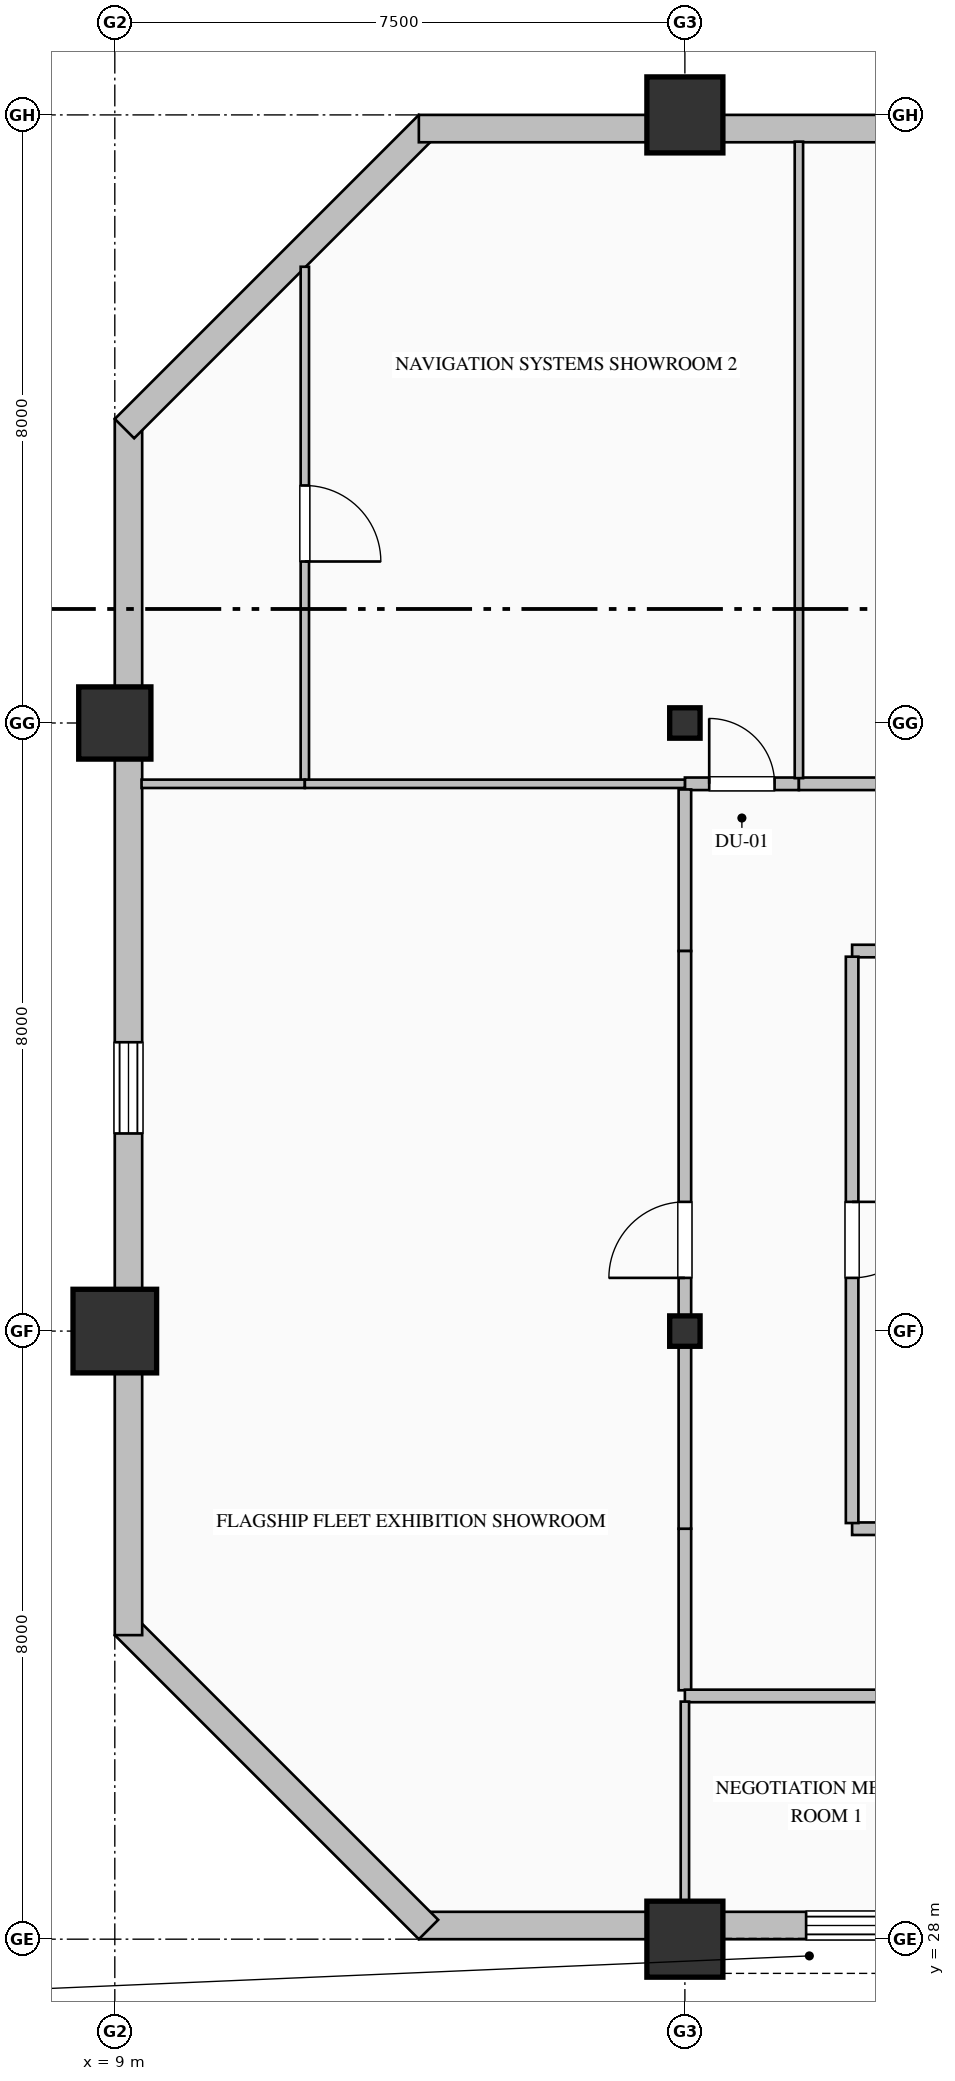
"""IFC4 building model, lengths in metres.
Left out: names, types, materials, properties, quantities, classifications, styles, units other than length and angle.
Written with IfcOpenShell. Run it as: python <this file> out.ifc"""

import sys

from ifc_helpers import new_model, si_unit, direction, frame, frame_2d, origin, origin_2d, place, context, subcontext, project, spatial, rectangle, hollow_rectangle, hollow_circle, i_section, extrude, element, fill, save


model = new_model("IFC4")
c1 = context("Model", 3, precision=1e-05, world=origin(), true_north=direction((0.0, 1.0)))
c2 = subcontext(c1, "Body", "Model", "MODEL_VIEW")
j1 = project(units=[si_unit("LENGTHUNIT", "METRE"), si_unit("PLANEANGLEUNIT", "RADIAN")], contexts=[c1])
p1 = place(None, origin())
s1 = spatial("IfcSite", under=j1, at=p1, CompositionType="ELEMENT")
p2 = place(p1, origin())
s2 = spatial("IfcBuilding", under=s1, at=p2, CompositionType="ELEMENT")
p3 = place(p2, frame((0.0, 0.0, 179.0)))
s3 = spatial("IfcBuildingStorey", under=s2, at=p3, CompositionType="ELEMENT", Elevation=179.0)
p4 = place(p3, frame((9.0, 36.0, 0.0), z_axis=(0.0, 0.0, 1.0), x_axis=(1.0, 0.0, 0.0)))
e1 = element("IfcColumn", 1, at=p4, inside=s3, PredefinedType="COLUMN", context=c2, shape_type="SweptSolid", body=[
    extrude(hollow_rectangle(XDim=1.1, YDim=1.1, WallThickness=0.04, at=origin_2d()), origin(), (0.0, 0.0, 1.0), 4.0),
])
p5 = place(p3, frame((9.0, 44.0, 0.0), z_axis=(0.0, 0.0, 1.0), x_axis=(1.0, 0.0, 0.0)))
e2 = element("IfcColumn", 2, at=p5, inside=s3, PredefinedType="COLUMN", context=c2, shape_type="SweptSolid", body=[
    extrude(hollow_rectangle(XDim=0.95, YDim=0.95, WallThickness=0.036, at=origin_2d()), origin(), (0.0, 0.0, 1.0), 4.0),
])
p6 = place(p3, frame((16.5, 28.0, 0.0), z_axis=(0.0, 0.0, 1.0), x_axis=(1.0, 0.0, 0.0)))
e3 = element("IfcColumn", 3, at=p6, inside=s3, PredefinedType="COLUMN", context=c2, shape_type="SweptSolid", body=[
    extrude(hollow_circle(Radius=0.5, WallThickness=0.036, at=origin_2d()), origin(), (0.0, 0.0, 1.0), 4.0),
])
for number, where, z_axis, x_axis in (
    (4, (16.5, 36.0, 0.0), (0.0, 0.0, 1.0), (1.0, 0.0, 0.0)),
    (5, (16.5, 44.0, 0.0), (0.0, 0.0, 1.0), (1.0, 0.0, 0.0)),
):
    element("IfcColumn", number, at=place(p3, frame(where, z_axis=z_axis, x_axis=x_axis)), inside=s3, PredefinedType="COLUMN", context=c2, shape_type="SweptSolid", body=[
        extrude(i_section(OverallWidth=0.4, OverallDepth=0.4, WebThickness=0.013, FlangeThickness=0.021, FilletRadius=0.022, at=origin_2d()), origin(), (0.0, 0.0, 1.0), 4.0),
    ])
p7 = place(p3, frame((16.5, 52.0, 0.0), z_axis=(0.0, 0.0, 1.0), x_axis=(1.0, 0.0, 0.0)))
e6 = element("IfcColumn", 6, at=p7, inside=s3, PredefinedType="COLUMN", context=c2, shape_type="SweptSolid", body=[
    extrude(hollow_circle(Radius=0.5, WallThickness=0.036, at=origin_2d()), origin(), (0.0, 0.0, 1.0), 4.0),
])
p8 = place(p3, frame((40.52, 28.18, 0.0), z_axis=(0.0, 0.0, 1.0), x_axis=(-1.0, 0.0, 0.0)))
e7 = element("IfcWall", 7, at=p8, inside=s3, PredefinedType="SOLIDWALL", context=c2, shape_type="SweptSolid", body=[
    extrude(rectangle(XDim=27.52, YDim=0.36, at=frame_2d((13.76, 0.0))), origin(), (0.0, 0.0, 1.0), 3.165),
])
p9 = place(p8, frame((13.8, 0.0, 0.7)))
e8 = element("IfcOpeningElement", 8, at=p9, cuts=e7, PredefinedType="OPENING", context=c2, shape_type="SweptSolid", body=[
    extrude(rectangle(XDim=1.2, YDim=1.85, at=frame_2d((0.6, 0.925))), frame((0.0, 0.19, 0.0), z_axis=(0.0, -1.0, 0.0), x_axis=(1.0, 0.0, 0.0)), (0.0, 0.0, 1.0), 0.38),
])
p10 = place(p8, frame((20.775, 0.0, 0.85)))
e9 = element("IfcOpeningElement", 9, at=p10, cuts=e7, PredefinedType="OPENING", context=c2, shape_type="SweptSolid", body=[
    extrude(rectangle(XDim=1.65, YDim=1.95, at=frame_2d((0.825, 0.975))), frame((0.0, 0.19, 0.0), z_axis=(0.0, -1.0, 0.0), x_axis=(1.0, 0.0, 0.0)), (0.0, 0.0, 1.0), 0.38),
])
p11 = place(p3, frame((13.127, 28.127, 0.0), z_axis=(0.0, 0.0, 1.0), x_axis=(-0.707106781187, 0.707106781187, 0.0)))
e10 = element("IfcWall", 10, at=p11, inside=s3, PredefinedType="SOLIDWALL", context=c2, shape_type="SweptSolid", body=[
    extrude(rectangle(XDim=5.657, YDim=0.36, at=frame_2d((2.828, 0.0))), origin(), (0.0, 0.0, 1.0), 3.765),
])
p12 = place(p3, frame((9.18, 32.0, 0.0), z_axis=(0.0, 0.0, 1.0), x_axis=(0.0, 1.0, 0.0)))
e11 = element("IfcWall", 11, at=p12, inside=s3, PredefinedType="SOLIDWALL", context=c2, shape_type="SweptSolid", body=[
    extrude(rectangle(XDim=16.0, YDim=0.36, at=frame_2d((8.0, 0.0))), origin(), (0.0, 0.0, 1.0), 3.265),
])
p13 = place(p12, frame((6.6, 0.0, 0.7)))
e12 = element("IfcOpeningElement", 12, at=p13, cuts=e11, PredefinedType="OPENING", context=c2, shape_type="SweptSolid", body=[
    extrude(rectangle(XDim=1.2, YDim=1.85, at=frame_2d((0.6, 0.925))), frame((0.0, 0.19, 0.0), z_axis=(0.0, -1.0, 0.0), x_axis=(1.0, 0.0, 0.0)), (0.0, 0.0, 1.0), 0.38),
])
p14 = place(p3, frame((9.127, 47.873, 0.0), z_axis=(0.0, 0.0, 1.0), x_axis=(0.707106781187, 0.707106781187, 0.0)))
e13 = element("IfcWall", 13, at=p14, inside=s3, PredefinedType="SOLIDWALL", context=c2, shape_type="SweptSolid", body=[
    extrude(rectangle(XDim=5.657, YDim=0.36, at=frame_2d((2.828, 0.0))), origin(), (0.0, 0.0, 1.0), 3.765),
])
p15 = place(p3, frame((13.0, 51.82, 0.0), z_axis=(0.0, 0.0, 1.0), x_axis=(1.0, 0.0, 0.0)))
e14 = element("IfcWall", 14, at=p15, inside=s3, PredefinedType="SOLIDWALL", context=c2, shape_type="SweptSolid", body=[
    extrude(rectangle(XDim=27.52, YDim=0.36, at=frame_2d((13.76, 0.0))), origin(), (0.0, 0.0, 1.0), 3.265),
])
p16 = place(p15, frame((6.375, 0.0, 0.85)))
e15 = element("IfcOpeningElement", 15, at=p16, cuts=e14, PredefinedType="OPENING", context=c2, shape_type="SweptSolid", body=[
    extrude(rectangle(XDim=1.65, YDim=1.95, at=frame_2d((0.825, 0.975))), frame((0.0, 0.19, 0.0), z_axis=(0.0, -1.0, 0.0), x_axis=(1.0, 0.0, 0.0)), (0.0, 0.0, 1.0), 0.38),
])
p17 = place(p15, frame((13.65, 0.0, 0.85)))
e16 = element("IfcOpeningElement", 16, at=p17, cuts=e14, PredefinedType="OPENING", context=c2, shape_type="SweptSolid", body=[
    extrude(rectangle(XDim=1.5, YDim=1.95, at=frame_2d((0.75, 0.975))), frame((0.0, 0.19, 0.0), z_axis=(0.0, -1.0, 0.0), x_axis=(1.0, 0.0, 0.0)), (0.0, 0.0, 1.0), 0.38),
])
p18 = place(p3, frame((18.7, 33.4, 0.0), z_axis=(0.0, 0.0, 1.0), x_axis=(1.0, 0.0, 0.0)))
e17 = element("IfcWall", 17, at=p18, inside=s3, PredefinedType="PARTITIONING", context=c2, shape_type="SweptSolid", body=[
    extrude(rectangle(XDim=4.8, YDim=0.165, at=frame_2d((2.4, 0.0))), origin(), (0.0, 0.0, 1.0), 3.765),
])
p19 = place(p3, frame((16.5, 31.274, 0.0), z_axis=(0.0, 0.0, 1.0), x_axis=(0.0, 1.0, 0.0)))
e18 = element("IfcWall", 18, at=p19, inside=s3, PredefinedType="PARTITIONING", context=c2, shape_type="SweptSolid", body=[
    extrude(rectangle(XDim=2.125, YDim=0.165, at=frame_2d((1.063, 0.0))), origin(), (0.0, 0.0, 1.0), 3.157),
])
p20 = place(p3, frame((23.5, 31.2, 0.0), z_axis=(0.0, 0.0, 1.0), x_axis=(-1.0, 0.0, 0.0)))
e19 = element("IfcWall", 19, at=p20, inside=s3, PredefinedType="PARTITIONING", context=c2, shape_type="SweptSolid", body=[
    extrude(rectangle(XDim=7.0, YDim=0.165, at=frame_2d((3.5, 0.0))), origin(), (0.0, 0.0, 1.0), 3.765),
])
p21 = place(p20, frame((2.95, 0.0, 0.0)))
e20 = element("IfcOpeningElement", 20, at=p21, cuts=e19, PredefinedType="OPENING", context=c2, shape_type="SweptSolid", body=[
    extrude(rectangle(XDim=1.1, YDim=2.2, at=frame_2d((0.55, 1.1))), frame((0.0, 0.093, 0.0), z_axis=(0.0, -1.0, 0.0), x_axis=(1.0, 0.0, 0.0)), (0.0, 0.0, 1.0), 0.185),
])
p22 = place(p3, frame((16.5, 43.2, 0.0), z_axis=(0.0, 0.0, 1.0), x_axis=(1.0, 0.0, 0.0)))
e21 = element("IfcWall", 21, at=p22, inside=s3, PredefinedType="PARTITIONING", context=c2, shape_type="SweptSolid", body=[
    extrude(rectangle(XDim=1.5, YDim=0.165, at=frame_2d((0.75, 0.0))), origin(), (0.0, 0.0, 1.0), 3.765),
])
p23 = place(p22, frame((0.32, 0.0, 0.0)))
e22 = element("IfcOpeningElement", 22, at=p23, cuts=e21, PredefinedType="OPENING", context=c2, shape_type="SweptSolid", body=[
    extrude(rectangle(XDim=0.86, YDim=2.1, at=frame_2d((0.43, 1.05))), frame((0.0, 0.093, 0.0), z_axis=(0.0, -1.0, 0.0), x_axis=(1.0, 0.0, 0.0)), (0.0, 0.0, 1.0), 0.185),
])
p24 = place(p3, frame((18.0, 43.2, 0.0), z_axis=(0.0, 0.0, 1.0), x_axis=(1.0, 0.0, 0.0)))
e23 = element("IfcWall", 23, at=p24, inside=s3, PredefinedType="PARTITIONING", context=c2, shape_type="SweptSolid", body=[
    extrude(rectangle(XDim=6.5, YDim=0.165, at=frame_2d((3.25, 0.0))), origin(), (0.0, 0.0, 1.0), 3.765),
])
p25 = place(p24, frame((2.75, 0.0, 0.0)))
e24 = element("IfcOpeningElement", 24, at=p25, cuts=e23, PredefinedType="OPENING", context=c2, shape_type="SweptSolid", body=[
    extrude(rectangle(XDim=1.0, YDim=2.15, at=frame_2d((0.5, 1.075))), frame((0.0, 0.093, 0.0), z_axis=(0.0, -1.0, 0.0), x_axis=(1.0, 0.0, 0.0)), (0.0, 0.0, 1.0), 0.185),
])
p26 = place(p3, frame((23.5, 41.0, 0.0), z_axis=(0.0, 0.0, 1.0), x_axis=(-1.0, 0.0, 0.0)))
e25 = element("IfcWall", 25, at=p26, inside=s3, PredefinedType="PARTITIONING", context=c2, shape_type="SweptSolid", body=[
    extrude(rectangle(XDim=4.8, YDim=0.165, at=frame_2d((2.4, 0.0))), origin(), (0.0, 0.0, 1.0), 3.765),
])
p27 = place(p3, frame((16.5, 41.0, 0.0), z_axis=(0.0, 0.0, 1.0), x_axis=(0.0, 1.0, 0.0)))
e26 = element("IfcWall", 26, at=p27, inside=s3, PredefinedType="PARTITIONING", context=c2, shape_type="SweptSolid", body=[
    extrude(rectangle(XDim=2.125, YDim=0.165, at=frame_2d((1.063, 0.0))), origin(), (0.0, 0.0, 1.0), 3.157),
])
p28 = place(p3, frame((18.7, 40.926, 0.0), z_axis=(0.0, 0.0, 1.0), x_axis=(0.0, -1.0, 0.0)))
e27 = element("IfcWall", 27, at=p28, inside=s3, PredefinedType="PARTITIONING", context=c2, shape_type="SweptSolid", body=[
    extrude(rectangle(XDim=7.451, YDim=0.165, at=frame_2d((3.726, 0.0))), origin(), (0.0, 0.0, 1.0), 3.765),
])
p29 = place(p28, frame((3.226, 0.0, 0.0)))
e28 = element("IfcOpeningElement", 28, at=p29, cuts=e27, PredefinedType="OPENING", context=c2, shape_type="SweptSolid", body=[
    extrude(rectangle(XDim=1.0, YDim=2.15, at=frame_2d((0.5, 1.075))), frame((0.0, 0.093, 0.0), z_axis=(0.0, -1.0, 0.0), x_axis=(1.0, 0.0, 0.0)), (0.0, 0.0, 1.0), 0.185),
])
p30 = place(p3, frame((16.5, 33.4, 0.0), z_axis=(0.0, 0.0, 1.0), x_axis=(0.0, 1.0, 0.0)))
e29 = element("IfcWall", 29, at=p30, inside=s3, PredefinedType="PARTITIONING", context=c2, shape_type="SweptSolid", body=[
    extrude(rectangle(XDim=7.6, YDim=0.165, at=frame_2d((3.8, 0.0))), origin(), (0.0, 0.0, 1.0), 3.157),
])
p31 = place(p30, frame((3.3, 0.0, 0.0)))
e30 = element("IfcOpeningElement", 30, at=p31, cuts=e29, PredefinedType="OPENING", context=c2, shape_type="SweptSolid", body=[
    extrude(rectangle(XDim=1.0, YDim=2.15, at=frame_2d((0.5, 1.075))), frame((0.0, 0.093, 0.0), z_axis=(0.0, -1.0, 0.0), x_axis=(1.0, 0.0, 0.0)), (0.0, 0.0, 1.0), 0.185),
])
p32 = place(p3, frame((11.5, 50.002, 0.0), z_axis=(0.0, 0.0, 1.0), x_axis=(0.0, -1.0, 0.0)))
e31 = element("IfcWall", 31, at=p32, inside=s3, PredefinedType="MOVABLE", context=c2, shape_type="SweptSolid", body=[
    extrude(rectangle(XDim=6.755, YDim=0.11, at=frame_2d((3.377, 0.0))), origin(), (0.0, 0.0, 1.0), 3.765),
])
p33 = place(p32, frame((2.878, 0.0, 0.0)))
e32 = element("IfcOpeningElement", 32, at=p33, cuts=e31, PredefinedType="OPENING", context=c2, shape_type="SweptSolid", body=[
    extrude(rectangle(XDim=1.0, YDim=2.15, at=frame_2d((0.5, 1.075))), frame((0.0, 0.065, 0.0), z_axis=(0.0, -1.0, 0.0), x_axis=(1.0, 0.0, 0.0)), (0.0, 0.0, 1.0), 0.13),
])
p34 = place(p3, frame((11.5, 43.2, 0.0), z_axis=(0.0, 0.0, 1.0), x_axis=(-1.0, 0.0, 0.0)))
e33 = element("IfcWall", 33, at=p34, inside=s3, PredefinedType="MOVABLE", context=c2, shape_type="SweptSolid", body=[
    extrude(rectangle(XDim=2.148, YDim=0.11, at=frame_2d((1.074, 0.0))), origin(), (0.0, 0.0, 1.0), 3.765),
])
p35 = place(p3, frame((18.0, 51.648, 0.0), z_axis=(0.0, 0.0, 1.0), x_axis=(0.0, -1.0, 0.0)))
e34 = element("IfcWall", 34, at=p35, inside=s3, PredefinedType="MOVABLE", context=c2, shape_type="SweptSolid", body=[
    extrude(rectangle(XDim=8.374, YDim=0.11, at=frame_2d((4.187, 0.0))), origin(), (0.0, 0.0, 1.0), 3.765),
])
p36 = place(p3, frame((16.5, 43.2, 0.0), z_axis=(0.0, 0.0, 1.0), x_axis=(-1.0, 0.0, 0.0)))
e35 = element("IfcWall", 35, at=p36, inside=s3, PredefinedType="MOVABLE", context=c2, shape_type="SweptSolid", body=[
    extrude(rectangle(XDim=5.0, YDim=0.11, at=frame_2d((2.5, 0.0))), origin(), (0.0, 0.0, 1.0), 3.765),
])
p37 = place(p3, frame((16.5, 31.125, 0.0), z_axis=(0.0, 0.0, 1.0), x_axis=(0.0, -1.0, 0.0)))
e36 = element("IfcWall", 36, at=p37, inside=s3, PredefinedType="MOVABLE", context=c2, shape_type="SweptSolid", body=[
    extrude(rectangle(XDim=2.773, YDim=0.11, at=frame_2d((1.387, 0.0))), origin(), (0.0, 0.0, 1.0), 3.157),
])
p38 = place(p10, origin())
e37 = element("IfcWindow", 37, at=p38, inside=s3, PartitioningType="DOUBLE_PANEL_VERTICAL", PredefinedType="WINDOW", context=c2, shape_type="SweptSolid", body=[
    extrude(rectangle(XDim=1.65, YDim=1.95, at=frame_2d((0.825, 0.975))), frame((0.0, 0.15, 0.0), z_axis=(0.0, -1.0, 0.0), x_axis=(1.0, 0.0, 0.0)), (0.0, 0.0, 1.0), 0.06),
])
fill(e9, e37)
p39 = place(p13, origin())
e38 = element("IfcWindow", 38, at=p39, inside=s3, PartitioningType="DOUBLE_PANEL_VERTICAL", PredefinedType="WINDOW", context=c2, shape_type="SweptSolid", body=[
    extrude(rectangle(XDim=1.2, YDim=1.85, at=frame_2d((0.6, 0.925))), frame((0.0, 0.15, 0.0), z_axis=(0.0, -1.0, 0.0), x_axis=(1.0, 0.0, 0.0)), (0.0, 0.0, 1.0), 0.06),
])
fill(e12, e38)
p40 = place(p33, origin())
e39 = element("IfcDoor", 39, at=p40, inside=s3, OperationType="SINGLE_SWING_RIGHT", PredefinedType="DOOR", context=c2, shape_type="SweptSolid", body=[
    extrude(rectangle(XDim=1.0, YDim=2.15, at=frame_2d((0.5, 1.075))), frame((0.0, 0.025, 0.0), z_axis=(0.0, -1.0, 0.0), x_axis=(1.0, 0.0, 0.0)), (0.0, 0.0, 1.0), 0.05),
])
fill(e32, e39)
p41 = place(p23, origin())
e40 = element("IfcDoor", 40, at=p41, inside=s3, OperationType="SINGLE_SWING_LEFT", PredefinedType="DOOR", context=c2, shape_type="SweptSolid", body=[
    extrude(rectangle(XDim=0.86, YDim=2.1, at=frame_2d((0.43, 1.05))), frame((0.0, 0.025, 0.0), z_axis=(0.0, -1.0, 0.0), x_axis=(1.0, 0.0, 0.0)), (0.0, 0.0, 1.0), 0.05),
])
fill(e22, e40)
p42 = place(p29, origin())
e41 = element("IfcDoor", 41, at=p42, inside=s3, OperationType="SINGLE_SWING_LEFT", PredefinedType="DOOR", context=c2, shape_type="SweptSolid", body=[
    extrude(rectangle(XDim=1.0, YDim=2.15, at=frame_2d((0.5, 1.075))), frame((0.0, 0.025, 0.0), z_axis=(0.0, -1.0, 0.0), x_axis=(1.0, 0.0, 0.0)), (0.0, 0.0, 1.0), 0.05),
])
fill(e28, e41)
p43 = place(p31, origin())
e42 = element("IfcDoor", 42, at=p43, inside=s3, OperationType="SINGLE_SWING_LEFT", PredefinedType="DOOR", context=c2, shape_type="SweptSolid", body=[
    extrude(rectangle(XDim=1.0, YDim=2.15, at=frame_2d((0.5, 1.075))), frame((0.0, 0.025, 0.0), z_axis=(0.0, -1.0, 0.0), x_axis=(1.0, 0.0, 0.0)), (0.0, 0.0, 1.0), 0.05),
])
fill(e30, e42)
save(model, sys.argv[1])
